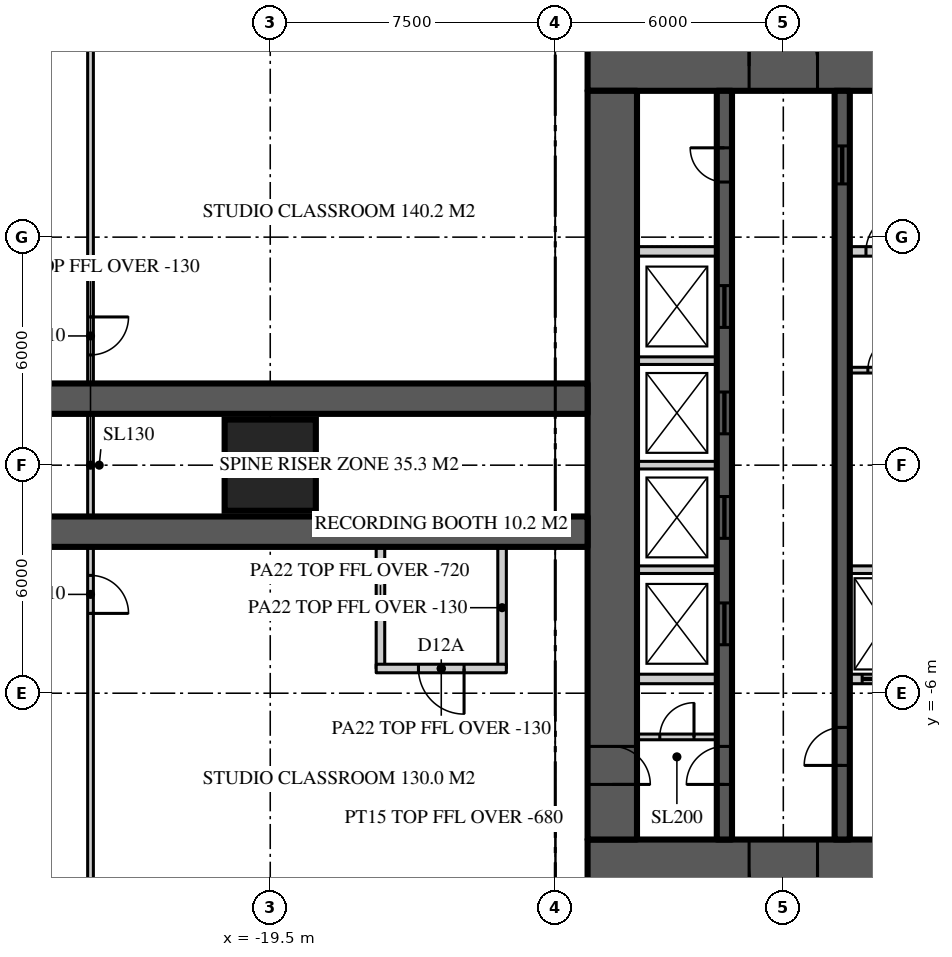
"""IFC4 building model, lengths in metres.
Left out: names, types, materials, properties, quantities, classifications, styles, units other than length and angle.
Written with IfcOpenShell. Run it as: python <this file> out.ifc"""

import sys

from ifc_helpers import new_model, si_unit, direction, frame, frame_2d, origin, origin_2d, place, context, subcontext, project, spatial, rectangle, extrude, element, fill, save


model = new_model("IFC4")
c1 = context("Model", 3, precision=1e-05, world=origin(), true_north=direction((0.0, 1.0)))
c2 = subcontext(c1, "Body", "Model", "MODEL_VIEW")
j1 = project(units=[si_unit("LENGTHUNIT", "METRE"), si_unit("PLANEANGLEUNIT", "RADIAN")], contexts=[c1])
p1 = place(None, origin())
s1 = spatial("IfcSite", under=j1, at=p1, CompositionType="ELEMENT")
p2 = place(p1, origin())
s2 = spatial("IfcBuilding", under=s1, at=p2, CompositionType="ELEMENT")
p3 = place(p2, frame((0.0, 0.0, 105.9)))
s3 = spatial("IfcBuildingStorey", under=s2, at=p3, CompositionType="ELEMENT", Elevation=105.9)
p4 = place(p3, frame((-11.15, 10.5, 0.0), z_axis=(0.0, 0.0, 1.0), x_axis=(1.0, 0.0, 0.0)))
e1 = element("IfcWall", 1, at=p4, inside=s3, PredefinedType="SHEAR", context=c2, shape_type="SweptSolid", body=[
    extrude(rectangle(XDim=22.3, YDim=1.3, at=frame_2d((11.15, 0.0))), origin(), (0.0, 0.0, 1.0), 3.9),
])
p5 = place(p4, frame((4.25, 0.0, 0.0)))
e2 = element("IfcOpeningElement", 2, at=p5, cuts=e1, PredefinedType="OPENING", context=c2, shape_type="SweptSolid", body=[
    extrude(rectangle(XDim=1.8, YDim=2.2, at=frame_2d((0.9, 1.1))), frame((0.0, 0.66, 0.0), z_axis=(0.0, -1.0, 0.0), x_axis=(1.0, 0.0, 0.0)), (0.0, 0.0, 1.0), 1.32),
])
p6 = place(p4, frame((16.25, 0.0, 0.0)))
e3 = element("IfcOpeningElement", 3, at=p6, cuts=e1, PredefinedType="OPENING", context=c2, shape_type="SweptSolid", body=[
    extrude(rectangle(XDim=1.8, YDim=2.2, at=frame_2d((0.9, 1.1))), frame((0.0, 0.66, 0.0), z_axis=(0.0, -1.0, 0.0), x_axis=(1.0, 0.0, 0.0)), (0.0, 0.0, 1.0), 1.32),
])
p7 = place(p3, frame((11.15, -10.5, 0.0), z_axis=(0.0, 0.0, 1.0), x_axis=(-1.0, 0.0, 0.0)))
e4 = element("IfcWall", 4, at=p7, inside=s3, PredefinedType="SHEAR", context=c2, shape_type="SweptSolid", body=[
    extrude(rectangle(XDim=22.3, YDim=1.3, at=frame_2d((11.15, 0.0))), origin(), (0.0, 0.0, 1.0), 3.9),
])
p8 = place(p7, frame((16.25, 0.0, 0.0)))
e5 = element("IfcOpeningElement", 5, at=p8, cuts=e4, PredefinedType="OPENING", context=c2, shape_type="SweptSolid", body=[
    extrude(rectangle(XDim=1.8, YDim=2.2, at=frame_2d((0.9, 1.1))), frame((0.0, 0.66, 0.0), z_axis=(0.0, -1.0, 0.0), x_axis=(1.0, 0.0, 0.0)), (0.0, 0.0, 1.0), 1.32),
])
p9 = place(p7, frame((4.25, 0.0, 0.0)))
e6 = element("IfcOpeningElement", 6, at=p9, cuts=e4, PredefinedType="OPENING", context=c2, shape_type="SweptSolid", body=[
    extrude(rectangle(XDim=1.8, YDim=2.2, at=frame_2d((0.9, 1.1))), frame((0.0, 0.66, 0.0), z_axis=(0.0, -1.0, 0.0), x_axis=(1.0, 0.0, 0.0)), (0.0, 0.0, 1.0), 1.32),
])
p10 = place(p3, frame((-10.5, 9.85, 0.0), z_axis=(0.0, 0.0, 1.0), x_axis=(0.0, -1.0, 0.0)))
e7 = element("IfcWall", 7, at=p10, inside=s3, PredefinedType="SHEAR", context=c2, shape_type="SweptSolid", body=[
    extrude(rectangle(XDim=19.7, YDim=1.3, at=frame_2d((9.85, 0.0))), origin(), (0.0, 0.0, 1.0), 3.9),
])
p11 = place(p10, frame((17.25, 0.0, 0.0)))
e8 = element("IfcOpeningElement", 8, at=p11, cuts=e7, PredefinedType="OPENING", context=c2, shape_type="SweptSolid", body=[
    extrude(rectangle(XDim=1.0, YDim=2.2, at=frame_2d((0.5, 1.1))), frame((0.0, 0.66, 0.0), z_axis=(0.0, -1.0, 0.0), x_axis=(1.0, 0.0, 0.0)), (0.0, 0.0, 1.0), 1.32),
])
for number, where, z_axis, x_axis in (
    (9, (-11.15, 1.75, 0.0), (0.0, 0.0, 1.0), (-1.0, 0.0, 0.0)),
    (10, (-11.15, -1.75, 0.0), (0.0, 0.0, 1.0), (-1.0, 0.0, 0.0)),
):
    element("IfcWall", number, at=place(p3, frame(where, z_axis=z_axis, x_axis=x_axis)), inside=s3, PredefinedType="SHEAR", context=c2, shape_type="SweptSolid", body=[
        extrude(rectangle(XDim=15.25, YDim=0.8, at=frame_2d((7.625, 0.0))), origin(), (0.0, 0.0, 1.0), 3.9),
    ])
p12 = place(p3, frame((-19.5, 0.0, 0.0), z_axis=(0.0, 0.0, 1.0), x_axis=(1.0, 0.0, 0.0)))
e11 = element("IfcColumn", 11, at=p12, inside=s3, PredefinedType="COLUMN", context=c2, shape_type="SweptSolid", body=[
    extrude(rectangle(XDim=2.4, YDim=2.4, at=origin_2d()), origin(), (0.0, 0.0, 1.0), 3.9),
])
p13 = place(p3, frame((-7.55, -9.85, 0.0), z_axis=(0.0, 0.0, 1.0), x_axis=(0.0, 1.0, 0.0)))
e12 = element("IfcWall", 12, at=p13, inside=s3, PredefinedType="SHEAR", context=c2, shape_type="SweptSolid", body=[
    extrude(rectangle(XDim=19.7, YDim=0.4, at=frame_2d((9.85, 0.0))), origin(), (0.0, 0.0, 1.0), 3.9),
])
p14 = place(p13, frame((1.45, 0.0, 0.0)))
e13 = element("IfcOpeningElement", 13, at=p14, cuts=e12, PredefinedType="OPENING", context=c2, shape_type="SweptSolid", body=[
    extrude(rectangle(XDim=1.0, YDim=2.2, at=frame_2d((0.5, 1.1))), frame((0.0, 0.21, 0.0), z_axis=(0.0, -1.0, 0.0), x_axis=(1.0, 0.0, 0.0)), (0.0, 0.0, 1.0), 0.42),
])
p15 = place(p13, frame((17.3, 0.0, 0.0)))
e14 = element("IfcOpeningElement", 14, at=p15, cuts=e12, PredefinedType="OPENING", context=c2, shape_type="SweptSolid", body=[
    extrude(rectangle(XDim=0.9, YDim=2.1, at=frame_2d((0.45, 1.05))), frame((0.0, 0.21, 0.0), z_axis=(0.0, -1.0, 0.0), x_axis=(1.0, 0.0, 0.0)), (0.0, 0.0, 1.0), 0.42),
])
p16 = place(p13, frame((5.125, 0.0, 0.0)))
e15 = element("IfcOpeningElement", 15, at=p16, cuts=e12, PredefinedType="OPENING", context=c2, shape_type="SweptSolid", body=[
    extrude(rectangle(XDim=1.1, YDim=2.2, at=frame_2d((0.55, 1.1))), frame((0.0, 0.21, 0.0), z_axis=(0.0, -1.0, 0.0), x_axis=(1.0, 0.0, 0.0)), (0.0, 0.0, 1.0), 0.42),
])
p17 = place(p13, frame((7.925, 0.0, 0.0)))
e16 = element("IfcOpeningElement", 16, at=p17, cuts=e12, PredefinedType="OPENING", context=c2, shape_type="SweptSolid", body=[
    extrude(rectangle(XDim=1.1, YDim=2.2, at=frame_2d((0.55, 1.1))), frame((0.0, 0.21, 0.0), z_axis=(0.0, -1.0, 0.0), x_axis=(1.0, 0.0, 0.0)), (0.0, 0.0, 1.0), 0.42),
])
p18 = place(p13, frame((10.675, 0.0, 0.0)))
e17 = element("IfcOpeningElement", 17, at=p18, cuts=e12, PredefinedType="OPENING", context=c2, shape_type="SweptSolid", body=[
    extrude(rectangle(XDim=1.1, YDim=2.2, at=frame_2d((0.55, 1.1))), frame((0.0, 0.21, 0.0), z_axis=(0.0, -1.0, 0.0), x_axis=(1.0, 0.0, 0.0)), (0.0, 0.0, 1.0), 0.42),
])
p19 = place(p13, frame((13.475, 0.0, 0.0)))
e18 = element("IfcOpeningElement", 18, at=p19, cuts=e12, PredefinedType="OPENING", context=c2, shape_type="SweptSolid", body=[
    extrude(rectangle(XDim=1.1, YDim=2.2, at=frame_2d((0.55, 1.1))), frame((0.0, 0.21, 0.0), z_axis=(0.0, -1.0, 0.0), x_axis=(1.0, 0.0, 0.0)), (0.0, 0.0, 1.0), 0.42),
])
p20 = place(p3, frame((-4.45, -9.85, 0.0), z_axis=(0.0, 0.0, 1.0), x_axis=(0.0, 1.0, 0.0)))
e19 = element("IfcWall", 19, at=p20, inside=s3, PredefinedType="SHEAR", context=c2, shape_type="SweptSolid", body=[
    extrude(rectangle(XDim=19.7, YDim=0.4, at=frame_2d((9.85, 0.0))), origin(), (0.0, 0.0, 1.0), 3.9),
])
p21 = place(p20, frame((1.95, 0.0, 0.0)))
e20 = element("IfcOpeningElement", 20, at=p21, cuts=e19, PredefinedType="OPENING", context=c2, shape_type="SweptSolid", body=[
    extrude(rectangle(XDim=1.0, YDim=2.2, at=frame_2d((0.5, 1.1))), frame((0.0, 0.21, 0.0), z_axis=(0.0, -1.0, 0.0), x_axis=(1.0, 0.0, 0.0)), (0.0, 0.0, 1.0), 0.42),
])
p22 = place(p20, frame((17.25, 0.0, 0.0)))
e21 = element("IfcOpeningElement", 21, at=p22, cuts=e19, PredefinedType="OPENING", context=c2, shape_type="SweptSolid", body=[
    extrude(rectangle(XDim=1.0, YDim=2.1, at=frame_2d((0.5, 1.05))), frame((0.0, 0.21, 0.0), z_axis=(0.0, -1.0, 0.0), x_axis=(1.0, 0.0, 0.0)), (0.0, 0.0, 1.0), 0.42),
])
p23 = place(p3, frame((-9.85, 5.625, 0.0), z_axis=(0.0, 0.0, 1.0), x_axis=(1.0, 0.0, 0.0)))
e22 = element("IfcWall", 22, at=p23, inside=s3, PredefinedType="SOLIDWALL", context=c2, shape_type="SweptSolid", body=[
    extrude(rectangle(XDim=2.1, YDim=0.25, at=frame_2d((1.05, 0.0))), origin(), (0.0, 0.0, 1.0), 3.7),
])
p24 = place(p3, frame((-4.25, 5.625, 0.0), z_axis=(0.0, 0.0, 1.0), x_axis=(1.0, 0.0, 0.0)))
e23 = element("IfcWall", 23, at=p24, inside=s3, PredefinedType="SOLIDWALL", context=c2, shape_type="SweptSolid", body=[
    extrude(rectangle(XDim=1.85, YDim=0.25, at=frame_2d((0.925, 0.0))), origin(), (0.0, 0.0, 1.0), 3.7),
])
p25 = place(p24, frame((0.425, 0.0, 0.0)))
e24 = element("IfcOpeningElement", 24, at=p25, cuts=e23, PredefinedType="OPENING", context=c2, shape_type="SweptSolid", body=[
    extrude(rectangle(XDim=1.0, YDim=2.2, at=frame_2d((0.5, 1.1))), frame((0.0, 0.135, 0.0), z_axis=(0.0, -1.0, 0.0), x_axis=(1.0, 0.0, 0.0)), (0.0, 0.0, 1.0), 0.27),
])
p26 = place(p3, frame((-9.85, -5.625, 0.0), z_axis=(0.0, 0.0, 1.0), x_axis=(1.0, 0.0, 0.0)))
e25 = element("IfcWall", 25, at=p26, inside=s3, PredefinedType="SOLIDWALL", context=c2, shape_type="SweptSolid", body=[
    extrude(rectangle(XDim=2.1, YDim=0.25, at=frame_2d((1.05, 0.0))), origin(), (0.0, 0.0, 1.0), 3.7),
])
p27 = place(p3, frame((-4.25, -5.625, 0.0), z_axis=(0.0, 0.0, 1.0), x_axis=(1.0, 0.0, 0.0)))
e26 = element("IfcWall", 26, at=p27, inside=s3, PredefinedType="SOLIDWALL", context=c2, shape_type="SweptSolid", body=[
    extrude(rectangle(XDim=1.85, YDim=0.25, at=frame_2d((0.925, 0.0))), origin(), (0.0, 0.0, 1.0), 3.7),
])
p28 = place(p27, frame((0.325, 0.0, 0.0)))
e27 = element("IfcOpeningElement", 27, at=p28, cuts=e26, PredefinedType="OPENING", context=c2, shape_type="SweptSolid", body=[
    extrude(rectangle(XDim=1.2, YDim=2.2, at=frame_2d((0.6, 1.1))), frame((0.0, 0.135, 0.0), z_axis=(0.0, -1.0, 0.0), x_axis=(1.0, 0.0, 0.0)), (0.0, 0.0, 1.0), 0.27),
])
p29 = place(p3, frame((-9.85, -2.75, 0.0), z_axis=(0.0, 0.0, 1.0), x_axis=(1.0, 0.0, 0.0)))
e28 = element("IfcWall", 28, at=p29, inside=s3, PredefinedType="SOLIDWALL", context=c2, shape_type="SweptSolid", body=[
    extrude(rectangle(XDim=2.1, YDim=0.2, at=frame_2d((1.05, 0.0))), origin(), (0.0, 0.0, 1.0), 3.7),
])
p30 = place(p3, frame((-4.25, -2.75, 0.0), z_axis=(0.0, 0.0, 1.0), x_axis=(1.0, 0.0, 0.0)))
e29 = element("IfcWall", 29, at=p30, inside=s3, PredefinedType="SOLIDWALL", context=c2, shape_type="SweptSolid", body=[
    extrude(rectangle(XDim=1.85, YDim=0.2, at=frame_2d((0.925, 0.0))), origin(), (0.0, 0.0, 1.0), 3.7),
])
for number, where, z_axis, x_axis in (
    (30, (-9.85, 0.0, 0.0), (0.0, 0.0, 1.0), (1.0, 0.0, 0.0)),
    (31, (-9.85, 2.75, 0.0), (0.0, 0.0, 1.0), (1.0, 0.0, 0.0)),
):
    element("IfcWall", number, at=place(p3, frame(where, z_axis=z_axis, x_axis=x_axis)), inside=s3, PredefinedType="SOLIDWALL", context=c2, shape_type="SweptSolid", body=[
        extrude(rectangle(XDim=2.1, YDim=0.2, at=frame_2d((1.05, 0.0))), origin(), (0.0, 0.0, 1.0), 3.7),
    ])
p31 = place(p3, frame((-24.229, 12.82, 0.0), z_axis=(0.0, 0.0, 1.0), x_axis=(0.0, -1.0, 0.0)))
e32 = element("IfcWall", 32, at=p31, inside=s3, PredefinedType="PARTITIONING", context=c2, shape_type="SweptSolid", body=[
    extrude(rectangle(XDim=25.64, YDim=0.15, at=frame_2d((12.82, 0.0))), origin(), (0.0, 0.0, 1.0), 3.77),
])
p32 = place(p31, frame((15.72, 0.0, 0.0)))
e33 = element("IfcOpeningElement", 33, at=p32, cuts=e32, PredefinedType="OPENING", context=c2, shape_type="SweptSolid", body=[
    extrude(rectangle(XDim=1.0, YDim=2.2, at=frame_2d((0.5, 1.1))), frame((0.0, 0.085, 0.0), z_axis=(0.0, -1.0, 0.0), x_axis=(1.0, 0.0, 0.0)), (0.0, 0.0, 1.0), 0.17),
])
p33 = place(p31, frame((8.92, 0.0, 0.0)))
e34 = element("IfcOpeningElement", 34, at=p33, cuts=e32, PredefinedType="OPENING", context=c2, shape_type="SweptSolid", body=[
    extrude(rectangle(XDim=1.0, YDim=2.2, at=frame_2d((0.5, 1.1))), frame((0.0, 0.085, 0.0), z_axis=(0.0, -1.0, 0.0), x_axis=(1.0, 0.0, 0.0)), (0.0, 0.0, 1.0), 0.17),
])
p34 = place(p3, frame((-13.4, -2.15, 0.0), z_axis=(0.0, 0.0, 1.0), x_axis=(0.0, -1.0, 0.0)))
e35 = element("IfcWall", 35, at=p34, inside=s3, PredefinedType="PARTITIONING", context=c2, shape_type="SweptSolid", body=[
    extrude(rectangle(XDim=3.2, YDim=0.225, at=frame_2d((1.6, 0.0))), origin(), (0.0, 0.0, 1.0), 3.77),
])
p35 = place(p3, frame((-16.6, -2.15, 0.0), z_axis=(0.0, 0.0, 1.0), x_axis=(0.0, -1.0, 0.0)))
e36 = element("IfcWall", 36, at=p35, inside=s3, PredefinedType="PARTITIONING", context=c2, shape_type="SweptSolid", body=[
    extrude(rectangle(XDim=3.2, YDim=0.225, at=frame_2d((1.6, 0.0))), origin(), (0.0, 0.0, 1.0), 3.18),
])
p36 = place(p3, frame((-13.288, -5.35, 0.0), z_axis=(0.0, 0.0, 1.0), x_axis=(-1.0, 0.0, 0.0)))
e37 = element("IfcWall", 37, at=p36, inside=s3, PredefinedType="PARTITIONING", context=c2, shape_type="SweptSolid", body=[
    extrude(rectangle(XDim=3.425, YDim=0.225, at=frame_2d((1.712, 0.0))), origin(), (0.0, 0.0, 1.0), 3.77),
])
p37 = place(p36, frame((1.113, 0.0, 0.0)))
e38 = element("IfcOpeningElement", 38, at=p37, cuts=e37, PredefinedType="OPENING", context=c2, shape_type="SweptSolid", body=[
    extrude(rectangle(XDim=1.2, YDim=2.2, at=frame_2d((0.6, 1.1))), frame((0.0, 0.123, 0.0), z_axis=(0.0, -1.0, 0.0), x_axis=(1.0, 0.0, 0.0)), (0.0, 0.0, 1.0), 0.245),
])
p38 = place(p3, frame((-4.25, 2.5, 0.0), z_axis=(0.0, 0.0, 1.0), x_axis=(1.0, 0.0, 0.0)))
e39 = element("IfcWall", 39, at=p38, inside=s3, PredefinedType="SOLIDWALL", context=c2, shape_type="SweptSolid", body=[
    extrude(rectangle(XDim=1.85, YDim=0.15, at=frame_2d((0.925, 0.0))), origin(), (0.0, 0.0, 1.0), 3.77),
])
p39 = place(p38, frame((0.475, 0.0, 0.0)))
e40 = element("IfcOpeningElement", 40, at=p39, cuts=e39, PredefinedType="OPENING", context=c2, shape_type="SweptSolid", body=[
    extrude(rectangle(XDim=0.9, YDim=2.1, at=frame_2d((0.45, 1.05))), frame((0.0, 0.085, 0.0), z_axis=(0.0, -1.0, 0.0), x_axis=(1.0, 0.0, 0.0)), (0.0, 0.0, 1.0), 0.17),
])
p40 = place(p3, frame((-9.85, -7.15, 0.0), z_axis=(0.0, 0.0, 1.0), x_axis=(1.0, 0.0, 0.0)))
e41 = element("IfcWall", 41, at=p40, inside=s3, PredefinedType="SOLIDWALL", context=c2, shape_type="SweptSolid", body=[
    extrude(rectangle(XDim=2.1, YDim=0.15, at=frame_2d((1.05, 0.0))), origin(), (0.0, 0.0, 1.0), 3.77),
])
p41 = place(p40, frame((0.6, 0.0, 0.0)))
e42 = element("IfcOpeningElement", 42, at=p41, cuts=e41, PredefinedType="OPENING", context=c2, shape_type="SweptSolid", body=[
    extrude(rectangle(XDim=0.9, YDim=2.1, at=frame_2d((0.45, 1.05))), frame((0.0, 0.085, 0.0), z_axis=(0.0, -1.0, 0.0), x_axis=(1.0, 0.0, 0.0)), (0.0, 0.0, 1.0), 0.17),
])
p42 = place(p5, origin())
e43 = element("IfcDoor", 43, at=p42, inside=s3, OperationType="DOUBLE_DOOR_DOUBLE_SWING", PredefinedType="DOOR", context=c2, shape_type="SweptSolid", body=[
    extrude(rectangle(XDim=1.8, YDim=2.2, at=frame_2d((0.9, 1.1))), frame((0.0, 0.025, 0.0), z_axis=(0.0, -1.0, 0.0), x_axis=(1.0, 0.0, 0.0)), (0.0, 0.0, 1.0), 0.05),
])
fill(e2, e43)
p43 = place(p8, origin())
e44 = element("IfcDoor", 44, at=p43, inside=s3, OperationType="DOUBLE_DOOR_DOUBLE_SWING", PredefinedType="DOOR", context=c2, shape_type="SweptSolid", body=[
    extrude(rectangle(XDim=1.8, YDim=2.2, at=frame_2d((0.9, 1.1))), frame((0.0, 0.025, 0.0), z_axis=(0.0, -1.0, 0.0), x_axis=(1.0, 0.0, 0.0)), (0.0, 0.0, 1.0), 0.05),
])
fill(e5, e44)
p44 = place(p14, origin())
e45 = element("IfcDoor", 45, at=p44, inside=s3, OperationType="SINGLE_SWING_LEFT", PredefinedType="DOOR", context=c2, shape_type="SweptSolid", body=[
    extrude(rectangle(XDim=1.0, YDim=2.2, at=frame_2d((0.5, 1.1))), frame((0.0, 0.025, 0.0), z_axis=(0.0, -1.0, 0.0), x_axis=(1.0, 0.0, 0.0)), (0.0, 0.0, 1.0), 0.05),
])
fill(e13, e45)
p45 = place(p11, origin())
e46 = element("IfcDoor", 46, at=p45, inside=s3, OperationType="SINGLE_SWING_RIGHT", PredefinedType="DOOR", context=c2, shape_type="SweptSolid", body=[
    extrude(rectangle(XDim=1.0, YDim=2.2, at=frame_2d((0.5, 1.1))), frame((0.0, 0.025, 0.0), z_axis=(0.0, -1.0, 0.0), x_axis=(1.0, 0.0, 0.0)), (0.0, 0.0, 1.0), 0.05),
])
fill(e8, e46)
p46 = place(p21, origin())
e47 = element("IfcDoor", 47, at=p46, inside=s3, OperationType="SINGLE_SWING_LEFT", PredefinedType="DOOR", context=c2, shape_type="SweptSolid", body=[
    extrude(rectangle(XDim=1.0, YDim=2.2, at=frame_2d((0.5, 1.1))), frame((0.0, 0.025, 0.0), z_axis=(0.0, -1.0, 0.0), x_axis=(1.0, 0.0, 0.0)), (0.0, 0.0, 1.0), 0.05),
])
fill(e20, e47)
p47 = place(p15, origin())
e48 = element("IfcDoor", 48, at=p47, inside=s3, OperationType="SINGLE_SWING_RIGHT", PredefinedType="DOOR", context=c2, shape_type="SweptSolid", body=[
    extrude(rectangle(XDim=0.9, YDim=2.1, at=frame_2d((0.45, 1.05))), frame((0.0, 0.025, 0.0), z_axis=(0.0, -1.0, 0.0), x_axis=(1.0, 0.0, 0.0)), (0.0, 0.0, 1.0), 0.05),
])
fill(e14, e48)
p48 = place(p22, origin())
e49 = element("IfcDoor", 49, at=p48, inside=s3, OperationType="SLIDING_TO_LEFT", PredefinedType="DOOR", context=c2, shape_type="SweptSolid", body=[
    extrude(rectangle(XDim=1.0, YDim=2.1, at=frame_2d((0.5, 1.05))), frame((0.0, 0.025, 0.0), z_axis=(0.0, -1.0, 0.0), x_axis=(1.0, 0.0, 0.0)), (0.0, 0.0, 1.0), 0.05),
])
fill(e21, e49)
p49 = place(p16, origin())
e50 = element("IfcDoor", 50, at=p49, inside=s3, OperationType="SLIDING_TO_LEFT", PredefinedType="DOOR", context=c2, shape_type="SweptSolid", body=[
    extrude(rectangle(XDim=1.1, YDim=2.2, at=frame_2d((0.55, 1.1))), frame((0.0, 0.025, 0.0), z_axis=(0.0, -1.0, 0.0), x_axis=(1.0, 0.0, 0.0)), (0.0, 0.0, 1.0), 0.05),
])
fill(e15, e50)
p50 = place(p17, origin())
e51 = element("IfcDoor", 51, at=p50, inside=s3, OperationType="SLIDING_TO_LEFT", PredefinedType="DOOR", context=c2, shape_type="SweptSolid", body=[
    extrude(rectangle(XDim=1.1, YDim=2.2, at=frame_2d((0.55, 1.1))), frame((0.0, 0.025, 0.0), z_axis=(0.0, -1.0, 0.0), x_axis=(1.0, 0.0, 0.0)), (0.0, 0.0, 1.0), 0.05),
])
fill(e16, e51)
p51 = place(p18, origin())
e52 = element("IfcDoor", 52, at=p51, inside=s3, OperationType="SLIDING_TO_LEFT", PredefinedType="DOOR", context=c2, shape_type="SweptSolid", body=[
    extrude(rectangle(XDim=1.1, YDim=2.2, at=frame_2d((0.55, 1.1))), frame((0.0, 0.025, 0.0), z_axis=(0.0, -1.0, 0.0), x_axis=(1.0, 0.0, 0.0)), (0.0, 0.0, 1.0), 0.05),
])
fill(e17, e52)
p52 = place(p19, origin())
e53 = element("IfcDoor", 53, at=p52, inside=s3, OperationType="SLIDING_TO_LEFT", PredefinedType="DOOR", context=c2, shape_type="SweptSolid", body=[
    extrude(rectangle(XDim=1.1, YDim=2.2, at=frame_2d((0.55, 1.1))), frame((0.0, 0.025, 0.0), z_axis=(0.0, -1.0, 0.0), x_axis=(1.0, 0.0, 0.0)), (0.0, 0.0, 1.0), 0.05),
])
fill(e18, e53)
p53 = place(p28, origin())
e54 = element("IfcDoor", 54, at=p53, inside=s3, OperationType="SLIDING_TO_LEFT", PredefinedType="DOOR", context=c2, shape_type="SweptSolid", body=[
    extrude(rectangle(XDim=1.2, YDim=2.2, at=frame_2d((0.6, 1.1))), frame((0.0, 0.025, 0.0), z_axis=(0.0, -1.0, 0.0), x_axis=(1.0, 0.0, 0.0)), (0.0, 0.0, 1.0), 0.05),
])
fill(e27, e54)
p54 = place(p32, origin())
e55 = element("IfcDoor", 55, at=p54, inside=s3, OperationType="SINGLE_SWING_RIGHT", PredefinedType="DOOR", context=c2, shape_type="SweptSolid", body=[
    extrude(rectangle(XDim=1.0, YDim=2.2, at=frame_2d((0.5, 1.1))), frame((0.0, 0.025, 0.0), z_axis=(0.0, -1.0, 0.0), x_axis=(1.0, 0.0, 0.0)), (0.0, 0.0, 1.0), 0.05),
])
fill(e33, e55)
p55 = place(p33, origin())
e56 = element("IfcDoor", 56, at=p55, inside=s3, OperationType="SINGLE_SWING_LEFT", PredefinedType="DOOR", context=c2, shape_type="SweptSolid", body=[
    extrude(rectangle(XDim=1.0, YDim=2.2, at=frame_2d((0.5, 1.1))), frame((0.0, 0.025, 0.0), z_axis=(0.0, -1.0, 0.0), x_axis=(1.0, 0.0, 0.0)), (0.0, 0.0, 1.0), 0.05),
])
fill(e34, e56)
p56 = place(p37, origin())
e57 = element("IfcDoor", 57, at=p56, inside=s3, OperationType="SINGLE_SWING_LEFT", PredefinedType="DOOR", context=c2, shape_type="SweptSolid", body=[
    extrude(rectangle(XDim=1.2, YDim=2.2, at=frame_2d((0.6, 1.1))), frame((0.0, 0.025, 0.0), z_axis=(0.0, -1.0, 0.0), x_axis=(1.0, 0.0, 0.0)), (0.0, 0.0, 1.0), 0.05),
])
fill(e38, e57)
p57 = place(p39, origin())
e58 = element("IfcDoor", 58, at=p57, inside=s3, OperationType="SINGLE_SWING_RIGHT", PredefinedType="DOOR", context=c2, shape_type="SweptSolid", body=[
    extrude(rectangle(XDim=0.9, YDim=2.1, at=frame_2d((0.45, 1.05))), frame((0.0, 0.025, 0.0), z_axis=(0.0, -1.0, 0.0), x_axis=(1.0, 0.0, 0.0)), (0.0, 0.0, 1.0), 0.05),
])
fill(e40, e58)
p58 = place(p25, origin())
e59 = element("IfcDoor", 59, at=p58, inside=s3, OperationType="SINGLE_SWING_RIGHT", PredefinedType="DOOR", context=c2, shape_type="SweptSolid", body=[
    extrude(rectangle(XDim=1.0, YDim=2.2, at=frame_2d((0.5, 1.1))), frame((0.0, 0.025, 0.0), z_axis=(0.0, -1.0, 0.0), x_axis=(1.0, 0.0, 0.0)), (0.0, 0.0, 1.0), 0.05),
])
fill(e24, e59)
p59 = place(p41, origin())
e60 = element("IfcDoor", 60, at=p59, inside=s3, OperationType="SINGLE_SWING_RIGHT", PredefinedType="DOOR", context=c2, shape_type="SweptSolid", body=[
    extrude(rectangle(XDim=0.9, YDim=2.1, at=frame_2d((0.45, 1.05))), frame((0.0, 0.025, 0.0), z_axis=(0.0, -1.0, 0.0), x_axis=(1.0, 0.0, 0.0)), (0.0, 0.0, 1.0), 0.05),
])
fill(e42, e60)
save(model, sys.argv[1])
